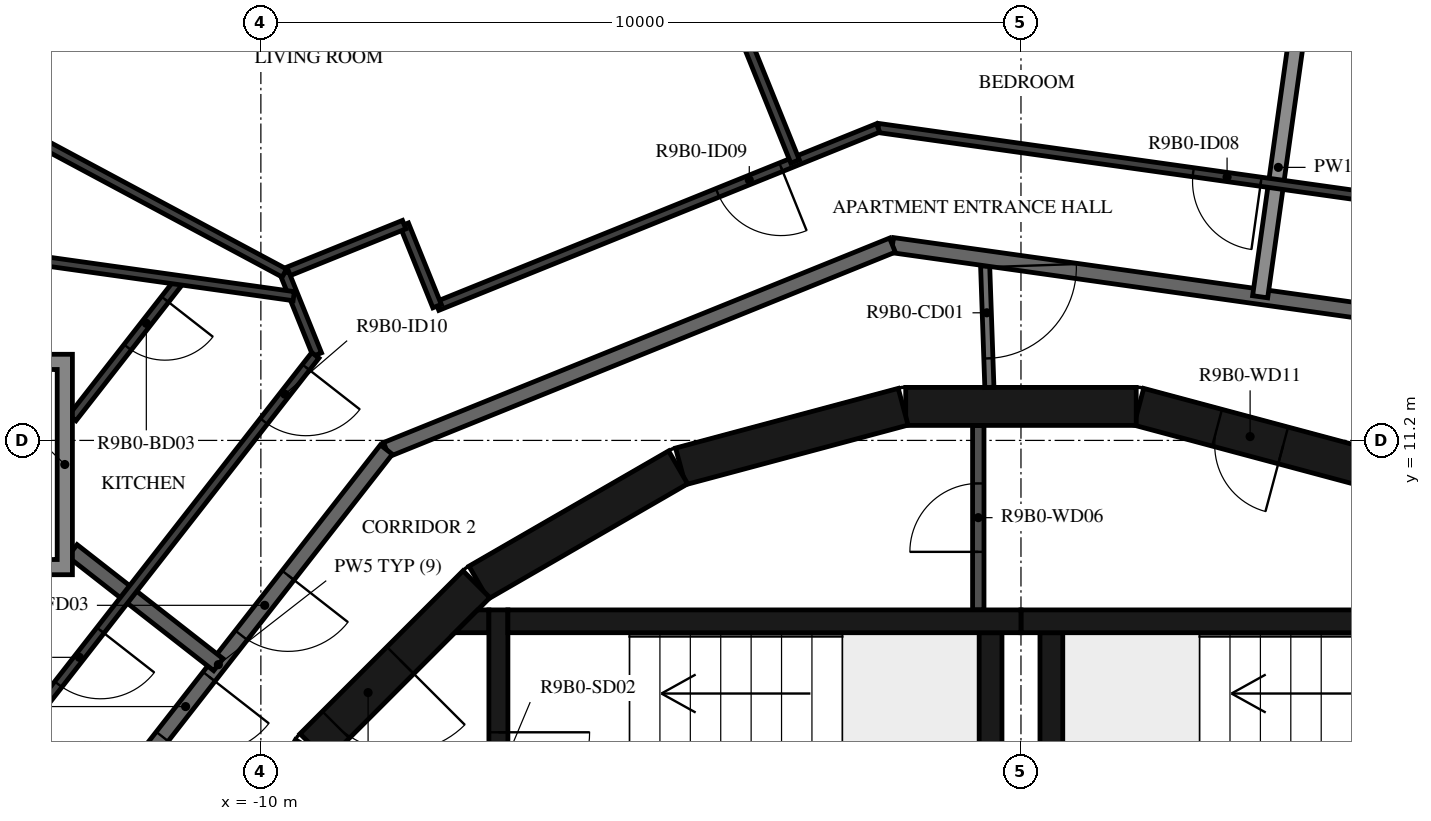
"""IFC4 building model, lengths in metres.
Left out: names, types, materials, properties, quantities, classifications, styles, units other than length and angle.
Written with IfcOpenShell. Run it as: python <this file> out.ifc"""

import sys

from ifc_helpers import new_model, si_unit, direction, frame, frame_2d, origin, place, context, subcontext, project, spatial, polyline, rectangle, outline, extrude, element, fill, save


model = new_model("IFC4")
c1 = context("Model", 3, precision=1e-05, world=origin(), true_north=direction((0.0, 1.0)))
c2 = subcontext(c1, "Body", "Model", "MODEL_VIEW")
j1 = project(units=[si_unit("LENGTHUNIT", "METRE"), si_unit("PLANEANGLEUNIT", "RADIAN")], contexts=[c1])
p1 = place(None, origin())
s1 = spatial("IfcSite", under=j1, at=p1, CompositionType="ELEMENT")
p2 = place(p1, origin())
s2 = spatial("IfcBuilding", under=s1, at=p2, CompositionType="ELEMENT")
p3 = place(p2, frame((0.0, 0.0, 347.0)))
s3 = spatial("IfcBuildingStorey", under=s2, at=p3, CompositionType="ELEMENT", Elevation=347.0)
p4 = place(p3, frame((4.479, 10.858, 0.0), z_axis=(0.0, 0.0, 1.0), x_axis=(-0.965948410781, 0.258734743916, 0.0)))
e1 = element("IfcWall", 1, at=p4, inside=s3, PredefinedType="SHEAR", context=c2, shape_type="SweptSolid", body=[
    extrude(rectangle(XDim=3.033, YDim=0.5, at=frame_2d((1.516, 0.0))), origin(), (0.0, 0.0, 1.0), 3.12),
])
p5 = place(p4, frame((1.066, 0.0, 0.0)))
e2 = element("IfcOpeningElement", 2, at=p5, cuts=e1, PredefinedType="OPENING", context=c2, shape_type="SweptSolid", body=[
    extrude(rectangle(XDim=0.9, YDim=2.1, at=frame_2d((0.45, 1.05))), frame((0.0, 0.26, 0.0), z_axis=(0.0, -1.0, 0.0), x_axis=(1.0, 0.0, 0.0)), (0.0, 0.0, 1.0), 0.52),
])
for number, where, z_axis, x_axis in (
    (3, (1.516, 11.647, 0.0), (0.0, 0.0, 1.0), (-1.0, 0.0, 0.0)),
    (4, (-1.55, 11.643, 0.0), (0.0, 0.0, 1.0), (-0.966, -0.259, 0.0)),
    (5, (-4.51, 10.845, 0.0), (0.0, 0.0, 1.0), (-0.866, -0.5, 0.0)),
):
    element("IfcWall", number, at=place(p3, frame(where, z_axis=z_axis, x_axis=x_axis)), inside=s3, PredefinedType="SHEAR", context=c2, shape_type="SweptSolid", body=[
        extrude(rectangle(XDim=3.033, YDim=0.5, at=frame_2d((1.516, 0.0))), origin(), (0.0, 0.0, 1.0), 3.12),
    ])
p6 = place(p3, frame((-7.164, 9.308, 0.0), z_axis=(0.0, 0.0, 1.0), x_axis=(-0.707106781187, -0.707106781187, 0.0)))
e6 = element("IfcWall", 6, at=p6, inside=s3, PredefinedType="SHEAR", context=c2, shape_type="SweptSolid", body=[
    extrude(rectangle(XDim=3.032, YDim=0.5, at=frame_2d((1.516, 0.0))), origin(), (0.0, 0.0, 1.0), 3.12),
])
p7 = place(p6, frame((1.416, 0.0, 0.0)))
e7 = element("IfcOpeningElement", 7, at=p7, cuts=e6, PredefinedType="OPENING", context=c2, shape_type="SweptSolid", body=[
    extrude(rectangle(XDim=1.2, YDim=2.1, at=frame_2d((0.6, 1.05))), frame((0.0, 0.26, 0.0), z_axis=(0.0, -1.0, 0.0), x_axis=(1.0, 0.0, 0.0)), (0.0, 0.0, 1.0), 0.52),
])
p8 = place(p3, frame((-9.329, 7.137, 0.0), z_axis=(0.0, 0.0, 1.0), x_axis=(-0.500087131594, -0.865975092491, 0.0)))
e8 = element("IfcWall", 8, at=p8, inside=s3, PredefinedType="SHEAR", context=c2, shape_type="SweptSolid", body=[
    extrude(rectangle(XDim=3.033, YDim=0.5, at=frame_2d((1.516, 0.0))), origin(), (0.0, 0.0, 1.0), 3.12),
])
p9 = place(p3, frame((0.0, 8.82, 0.0), z_axis=(0.0, 0.0, 1.0), x_axis=(1.0, 0.0, 0.0)))
e9 = element("IfcWall", 9, at=p9, inside=s3, PredefinedType="SHEAR", context=c2, shape_type="SweptSolid", body=[
    extrude(rectangle(XDim=6.75, YDim=0.3, at=frame_2d((3.375, 0.0))), origin(), (0.0, 0.0, 1.0), 3.12),
])
p10 = place(p3, frame((0.4, 5.35, 0.0), z_axis=(0.0, 0.0, 1.0), x_axis=(0.0, 1.0, 0.0)))
e10 = element("IfcWall", 10, at=p10, inside=s3, PredefinedType="SHEAR", context=c2, shape_type="SweptSolid", body=[
    extrude(rectangle(XDim=3.32, YDim=0.3, at=frame_2d((1.66, 0.0))), origin(), (0.0, 0.0, 1.0), 3.12),
])
p11 = place(p3, frame((-6.75, 8.82, 0.0), z_axis=(0.0, 0.0, 1.0), x_axis=(1.0, 0.0, 0.0)))
e11 = element("IfcWall", 11, at=p11, inside=s3, PredefinedType="SHEAR", context=c2, shape_type="SweptSolid", body=[
    extrude(rectangle(XDim=6.75, YDim=0.3, at=frame_2d((3.375, 0.0))), origin(), (0.0, 0.0, 1.0), 3.12),
])
p12 = place(p3, frame((-0.4, 5.35, 0.0), z_axis=(0.0, 0.0, 1.0), x_axis=(0.0, 1.0, 0.0)))
e12 = element("IfcWall", 12, at=p12, inside=s3, PredefinedType="SHEAR", context=c2, shape_type="SweptSolid", body=[
    extrude(rectangle(XDim=3.32, YDim=0.3, at=frame_2d((1.66, 0.0))), origin(), (0.0, 0.0, 1.0), 3.12),
])
p13 = place(p3, frame((-6.875, 8.97, 0.0), z_axis=(0.0, 0.0, 1.0), x_axis=(0.0, -1.0, 0.0)))
e13 = element("IfcWall", 13, at=p13, inside=s3, PredefinedType="SHEAR", context=c2, shape_type="SweptSolid", body=[
    extrude(rectangle(XDim=3.92, YDim=0.25, at=frame_2d((1.96, 0.0))), origin(), (0.0, 0.0, 1.0), 3.12),
])
p14 = place(p13, frame((1.61, 0.0, 0.0)))
e14 = element("IfcOpeningElement", 14, at=p14, cuts=e13, PredefinedType="OPENING", context=c2, shape_type="SweptSolid", body=[
    extrude(rectangle(XDim=1.2, YDim=2.1, at=frame_2d((0.6, 1.05))), frame((0.0, 0.135, 0.0), z_axis=(0.0, -1.0, 0.0), x_axis=(1.0, 0.0, 0.0)), (0.0, 0.0, 1.0), 0.27),
])
p15 = place(p3, origin())
e15 = element("IfcWall", 15, at=p15, inside=s3, PredefinedType="SHEAR", context=c2, shape_type="SweptSolid", body=[
    extrude(outline(polyline([(-7.148, 8.97), (-7.0, 8.97), (-7.0, 8.67), (-7.448, 8.67), (-7.148, 8.97)])), origin(), (0.0, 0.0, 1.0), 3.12),
])
p16 = place(p3, frame((-0.562, 8.97, 0.0), z_axis=(0.0, 0.0, 1.0), x_axis=(0.0, 1.0, 0.0)))
e16 = element("IfcWall", 16, at=p16, inside=s3, PredefinedType="PARTITIONING", context=c2, shape_type="SweptSolid", body=[
    extrude(rectangle(XDim=2.427, YDim=0.15, at=frame_2d((1.214, 0.0))), origin(), (0.0, 0.0, 1.0), 3.12),
])
p17 = place(p16, frame((0.764, 0.0, 0.0)))
e17 = element("IfcOpeningElement", 17, at=p17, cuts=e16, PredefinedType="OPENING", context=c2, shape_type="SweptSolid", body=[
    extrude(rectangle(XDim=0.9, YDim=2.1, at=frame_2d((0.45, 1.05))), frame((0.0, 0.085, 0.0), z_axis=(0.0, -1.0, 0.0), x_axis=(1.0, 0.0, 0.0)), (0.0, 0.0, 1.0), 0.17),
])
p18 = place(p3, frame((-0.475, 13.598, 0.0), z_axis=(0.0, 0.0, 1.0), x_axis=(0.034852521429, -0.999392466326, 0.0)))
e18 = element("IfcWall", 18, at=p18, inside=s3, PredefinedType="PARTITIONING", context=c2, shape_type="SweptSolid", body=[
    extrude(rectangle(XDim=1.702, YDim=0.12, at=frame_2d((0.851, 0.0))), origin(), (0.0, 0.0, 1.0), 3.12),
])
p19 = place(p18, frame((0.12, 0.0, 0.0)))
e19 = element("IfcOpeningElement", 19, at=p19, cuts=e18, PredefinedType="OPENING", context=c2, shape_type="SweptSolid", body=[
    extrude(rectangle(XDim=1.2, YDim=2.1, at=frame_2d((0.6, 1.05))), frame((0.0, 0.07, 0.0), z_axis=(0.0, -1.0, 0.0), x_axis=(1.0, 0.0, 0.0)), (0.0, 0.0, 1.0), 0.14),
])
p20 = place(p3, frame((5.42, 12.77, 0.0), z_axis=(0.0, 0.0, 1.0), x_axis=(-0.990270565508, 0.139155334385, 0.0)))
e20 = element("IfcWall", 20, at=p20, inside=s3, PredefinedType="STANDARD", context=c2, shape_type="SweptSolid", body=[
    extrude(rectangle(XDim=7.181, YDim=0.2, at=frame_2d((3.59, 0.0))), origin(), (0.0, 0.0, 1.0), 3.12),
])
p21 = place(p3, frame((-1.691, 13.769, 0.0), z_axis=(0.0, 0.0, 1.0), x_axis=(-0.92717916932, -0.374618189599, 0.0)))
e21 = element("IfcWall", 21, at=p21, inside=s3, PredefinedType="STANDARD", context=c2, shape_type="SweptSolid", body=[
    extrude(rectangle(XDim=7.181, YDim=0.2, at=frame_2d((3.591, 0.0))), origin(), (0.0, 0.0, 1.0), 3.12),
])
p22 = place(p3, frame((-8.349, 11.079, 0.0), z_axis=(0.0, 0.0, 1.0), x_axis=(-0.615669112324, -0.78800478687, 0.0)))
e22 = element("IfcWall", 22, at=p22, inside=s3, PredefinedType="STANDARD", context=c2, shape_type="SweptSolid", body=[
    extrude(rectangle(XDim=7.181, YDim=0.2, at=frame_2d((3.591, 0.0))), origin(), (0.0, 0.0, 1.0), 3.12),
])
p23 = place(p22, frame((2.1, 0.0, 0.0)))
e23 = element("IfcOpeningElement", 23, at=p23, cuts=e22, PredefinedType="OPENING", context=c2, shape_type="SweptSolid", body=[
    extrude(rectangle(XDim=1.0, YDim=2.1, at=frame_2d((0.5, 1.05))), frame((0.0, 0.11, 0.0), z_axis=(0.0, -1.0, 0.0), x_axis=(1.0, 0.0, 0.0)), (0.0, 0.0, 1.0), 0.22),
])
p24 = place(p22, frame((3.79, 0.0, 0.0)))
e24 = element("IfcOpeningElement", 24, at=p24, cuts=e22, PredefinedType="OPENING", context=c2, shape_type="SweptSolid", body=[
    extrude(rectangle(XDim=1.0, YDim=2.1, at=frame_2d((0.5, 1.05))), frame((0.0, 0.11, 0.0), z_axis=(0.0, -1.0, 0.0), x_axis=(1.0, 0.0, 0.0)), (0.0, 0.0, 1.0), 0.22),
])
p25 = place(p3, frame((3.625, 16.494, 0.0), z_axis=(0.0, 0.0, 1.0), x_axis=(-0.139174320859, -0.990267897295, 0.0)))
e25 = element("IfcWall", 25, at=p25, inside=s3, PredefinedType="STANDARD", context=c2, shape_type="SweptSolid", body=[
    extrude(rectangle(XDim=3.438, YDim=0.2, at=frame_2d((1.719, 0.0))), origin(), (0.0, 0.0, 1.0), 2.73),
])
p26 = place(p3, frame((-12.479, 9.75, 0.0), z_axis=(0.0, 0.0, 1.0), x_axis=(0.788050197026, -0.615610986717, 0.0)))
e26 = element("IfcWall", 26, at=p26, inside=s3, PredefinedType="STANDARD", context=c2, shape_type="SweptSolid", body=[
    extrude(rectangle(XDim=2.437, YDim=0.2, at=frame_2d((1.218, 0.0))), origin(), (0.0, 0.0, 1.0), 3.12),
])
p27 = place(p3, frame((6.027, 14.199, 0.0), z_axis=(0.0, 0.0, 1.0), x_axis=(-0.990271593532, 0.139148018469, 0.0)))
e27 = element("IfcWall", 27, at=p27, inside=s3, PredefinedType="PARTITIONING", context=c2, shape_type="SweptSolid", body=[
    extrude(rectangle(XDim=7.985, YDim=0.12, at=frame_2d((3.992, 0.0))), origin(), (0.0, 0.0, 1.0), 3.12),
])
p28 = place(p27, frame((2.898, 0.0, 0.0)))
e28 = element("IfcOpeningElement", 28, at=p28, cuts=e27, PredefinedType="OPENING", context=c2, shape_type="SweptSolid", body=[
    extrude(rectangle(XDim=0.9, YDim=2.1, at=frame_2d((0.45, 1.05))), frame((0.0, 0.07, 0.0), z_axis=(0.0, -1.0, 0.0), x_axis=(1.0, 0.0, 0.0)), (0.0, 0.0, 1.0), 0.14),
])
p29 = place(p3, frame((-1.88, 15.311, 0.0), z_axis=(0.0, 0.0, 1.0), x_axis=(-0.927182163322, -0.374610779365, 0.0)))
e29 = element("IfcWall", 29, at=p29, inside=s3, PredefinedType="PARTITIONING", context=c2, shape_type="SweptSolid", body=[
    extrude(rectangle(XDim=6.257, YDim=0.12, at=frame_2d((3.128, 0.0))), origin(), (0.0, 0.0, 1.0), 3.12),
])
p30 = place(p29, frame((1.377, 0.0, 0.0)))
e30 = element("IfcOpeningElement", 30, at=p30, cuts=e29, PredefinedType="OPENING", context=c2, shape_type="SweptSolid", body=[
    extrude(rectangle(XDim=0.9, YDim=2.1, at=frame_2d((0.45, 1.05))), frame((0.0, 0.07, 0.0), z_axis=(0.0, -1.0, 0.0), x_axis=(1.0, 0.0, 0.0)), (0.0, 0.0, 1.0), 0.14),
])
p31 = place(p3, frame((-7.681, 12.967, 0.0), z_axis=(0.0, 0.0, 1.0), x_axis=(-0.374592224266, 0.927189659951, 0.0)))
e31 = element("IfcWall", 31, at=p31, inside=s3, PredefinedType="PARTITIONING", context=c2, shape_type="SweptSolid", body=[
    extrude(rectangle(XDim=1.156, YDim=0.12, at=frame_2d((0.578, 0.0))), origin(), (0.0, 0.0, 1.0), 3.12),
])
p32 = place(p3, frame((-8.115, 14.039, 0.0), z_axis=(0.0, 0.0, 1.0), x_axis=(-0.927153589835, -0.374681492546, 0.0)))
e32 = element("IfcWall", 32, at=p32, inside=s3, PredefinedType="PARTITIONING", context=c2, shape_type="SweptSolid", body=[
    extrude(rectangle(XDim=1.7, YDim=0.12, at=frame_2d((0.85, 0.0))), origin(), (0.0, 0.0, 1.0), 3.12),
])
p33 = place(p3, frame((-9.691, 13.402, 0.0), z_axis=(0.0, 0.0, 1.0), x_axis=(0.374484003097, -0.927233374844, 0.0)))
e33 = element("IfcWall", 33, at=p33, inside=s3, PredefinedType="PARTITIONING", context=c2, shape_type="SweptSolid", body=[
    extrude(rectangle(XDim=1.156, YDim=0.12, at=frame_2d((0.578, 0.0))), origin(), (0.0, 0.0, 1.0), 3.12),
])
p34 = place(p3, frame((-9.283, 12.319, 0.0), z_axis=(0.0, 0.0, 1.0), x_axis=(-0.61567489546, -0.788000268464, 0.0)))
e34 = element("IfcWall", 34, at=p34, inside=s3, PredefinedType="PARTITIONING", context=c2, shape_type="SweptSolid", body=[
    extrude(rectangle(XDim=7.985, YDim=0.12, at=frame_2d((3.992, 0.0))), origin(), (0.0, 0.0, 1.0), 3.12),
])
p35 = place(p34, frame((0.2, 0.0, 0.0)))
e35 = element("IfcOpeningElement", 35, at=p35, cuts=e34, PredefinedType="OPENING", context=c2, shape_type="SweptSolid", body=[
    extrude(rectangle(XDim=0.9, YDim=2.1, at=frame_2d((0.45, 1.05))), frame((0.0, 0.07, 0.0), z_axis=(0.0, -1.0, 0.0), x_axis=(1.0, 0.0, 0.0)), (0.0, 0.0, 1.0), 0.14),
])
p36 = place(p34, frame((4.592, 0.0, 0.0)))
e36 = element("IfcOpeningElement", 36, at=p36, cuts=e34, PredefinedType="OPENING", context=c2, shape_type="SweptSolid", body=[
    extrude(rectangle(XDim=0.9, YDim=2.1, at=frame_2d((0.45, 1.05))), frame((0.0, 0.07, 0.0), z_axis=(0.0, -1.0, 0.0), x_axis=(1.0, 0.0, 0.0)), (0.0, 0.0, 1.0), 0.14),
])
p37 = place(p3, frame((-4.065, 17.575, 0.0), z_axis=(0.0, 0.0, 1.0), x_axis=(0.374619347258, -0.927178701578, 0.0)))
e37 = element("IfcWall", 37, at=p37, inside=s3, PredefinedType="PARTITIONING", context=c2, shape_type="SweptSolid", body=[
    extrude(rectangle(XDim=2.918, YDim=0.12, at=frame_2d((1.459, 0.0))), origin(), (0.0, 0.0, 1.0), 3.12),
])
p38 = place(p3, frame((-17.896, 17.797, 0.0), z_axis=(0.0, 0.0, 1.0), x_axis=(0.88150492406, -0.4721748287, 0.0)))
e38 = element("IfcWall", 38, at=p38, inside=s3, PredefinedType="PARTITIONING", context=c2, shape_type="SweptSolid", body=[
    extrude(rectangle(XDim=9.308, YDim=0.12, at=frame_2d((4.654, 0.0))), origin(), (0.0, 0.0, 1.0), 3.12),
])
p39 = place(p38, frame((0.6, 0.0, 0.0)))
e39 = element("IfcOpeningElement", 39, at=p39, cuts=e38, PredefinedType="OPENING", context=c2, shape_type="SweptSolid", body=[
    extrude(rectangle(XDim=0.9, YDim=2.1, at=frame_2d((0.45, 1.05))), frame((0.0, 0.07, 0.0), z_axis=(0.0, -1.0, 0.0), x_axis=(1.0, 0.0, 0.0)), (0.0, 0.0, 1.0), 0.14),
])
p40 = place(p3, frame((-11.064, 13.308, 0.0), z_axis=(0.0, 0.0, 1.0), x_axis=(-0.615681126827, -0.787995399777, 0.0)))
e40 = element("IfcWall", 40, at=p40, inside=s3, PredefinedType="PARTITIONING", context=c2, shape_type="SweptSolid", body=[
    extrude(rectangle(XDim=2.3, YDim=0.12, at=frame_2d((1.15, 0.0))), origin(), (0.0, 0.0, 1.0), 3.12),
])
p41 = place(p40, frame((0.32, 0.0, 0.0)))
e41 = element("IfcOpeningElement", 41, at=p41, cuts=e40, PredefinedType="OPENING", context=c2, shape_type="SweptSolid", body=[
    extrude(rectangle(XDim=0.8, YDim=2.1, at=frame_2d((0.4, 1.05))), frame((0.0, 0.07, 0.0), z_axis=(0.0, -1.0, 0.0), x_axis=(1.0, 0.0, 0.0)), (0.0, 0.0, 1.0), 0.14),
])
p42 = place(p3, frame((-9.568, 13.097, 0.0), z_axis=(0.0, 0.0, 1.0), x_axis=(-0.990266931728, 0.13918119099, 0.0)))
e42 = element("IfcWall", 42, at=p42, inside=s3, PredefinedType="PARTITIONING", context=c2, shape_type="SweptSolid", body=[
    extrude(rectangle(XDim=3.708, YDim=0.12, at=frame_2d((1.854, 0.0))), origin(), (0.0, 0.0, 1.0), 3.12),
])
p43 = place(p3, origin())
e43 = element("IfcWall", 43, at=p43, inside=s3, PredefinedType="STANDARD", context=c2, shape_type="SweptSolid", body=[
    extrude(outline(polyline([(-12.479, 12.333), (-12.479, 9.433), (-15.379, 9.433), (-15.379, 12.333), (-12.479, 12.333)]), holes=[polyline([(-15.179, 9.633), (-12.679, 9.633), (-12.679, 12.133), (-15.179, 12.133), (-15.179, 9.633)])]), origin(), (0.0, 0.0, 1.0), 3.12),
])
p44 = place(p14, origin())
e44 = element("IfcDoor", 44, at=p44, inside=s3, OperationType="SINGLE_SWING_LEFT", PredefinedType="DOOR", context=c2, shape_type="SweptSolid", body=[
    extrude(rectangle(XDim=1.2, YDim=2.1, at=frame_2d((0.6, 1.05))), frame((0.0, 0.025, 0.0), z_axis=(0.0, -1.0, 0.0), x_axis=(1.0, 0.0, 0.0)), (0.0, 0.0, 1.0), 0.05),
])
fill(e14, e44)
p45 = place(p7, origin())
e45 = element("IfcDoor", 45, at=p45, inside=s3, OperationType="SINGLE_SWING_RIGHT", PredefinedType="DOOR", context=c2, shape_type="SweptSolid", body=[
    extrude(rectangle(XDim=1.2, YDim=2.1, at=frame_2d((0.6, 1.05))), frame((0.0, 0.025, 0.0), z_axis=(0.0, -1.0, 0.0), x_axis=(1.0, 0.0, 0.0)), (0.0, 0.0, 1.0), 0.05),
])
fill(e7, e45)
p46 = place(p17, origin())
e46 = element("IfcDoor", 46, at=p46, inside=s3, OperationType="SINGLE_SWING_RIGHT", PredefinedType="DOOR", context=c2, shape_type="SweptSolid", body=[
    extrude(rectangle(XDim=0.9, YDim=2.1, at=frame_2d((0.45, 1.05))), frame((0.0, 0.025, 0.0), z_axis=(0.0, -1.0, 0.0), x_axis=(1.0, 0.0, 0.0)), (0.0, 0.0, 1.0), 0.05),
])
fill(e17, e46)
p47 = place(p5, origin())
e47 = element("IfcDoor", 47, at=p47, inside=s3, OperationType="SINGLE_SWING_LEFT", PredefinedType="DOOR", context=c2, shape_type="SweptSolid", body=[
    extrude(rectangle(XDim=0.9, YDim=2.1, at=frame_2d((0.45, 1.05))), frame((0.0, 0.025, 0.0), z_axis=(0.0, -1.0, 0.0), x_axis=(1.0, 0.0, 0.0)), (0.0, 0.0, 1.0), 0.05),
])
fill(e2, e47)
p48 = place(p23, origin())
e48 = element("IfcDoor", 48, at=p48, inside=s3, OperationType="SINGLE_SWING_RIGHT", PredefinedType="DOOR", context=c2, shape_type="SweptSolid", body=[
    extrude(rectangle(XDim=1.0, YDim=2.1, at=frame_2d((0.5, 1.05))), frame((0.0, 0.025, 0.0), z_axis=(0.0, -1.0, 0.0), x_axis=(1.0, 0.0, 0.0)), (0.0, 0.0, 1.0), 0.05),
])
fill(e23, e48)
p49 = place(p28, origin())
e49 = element("IfcDoor", 49, at=p49, inside=s3, OperationType="SINGLE_SWING_LEFT", PredefinedType="DOOR", context=c2, shape_type="SweptSolid", body=[
    extrude(rectangle(XDim=0.9, YDim=2.1, at=frame_2d((0.45, 1.05))), frame((0.0, 0.025, 0.0), z_axis=(0.0, -1.0, 0.0), x_axis=(1.0, 0.0, 0.0)), (0.0, 0.0, 1.0), 0.05),
])
fill(e28, e49)
p50 = place(p30, origin())
e50 = element("IfcDoor", 50, at=p50, inside=s3, OperationType="SINGLE_SWING_RIGHT", PredefinedType="DOOR", context=c2, shape_type="SweptSolid", body=[
    extrude(rectangle(XDim=0.9, YDim=2.1, at=frame_2d((0.45, 1.05))), frame((0.0, 0.025, 0.0), z_axis=(0.0, -1.0, 0.0), x_axis=(1.0, 0.0, 0.0)), (0.0, 0.0, 1.0), 0.05),
])
fill(e30, e50)
p51 = place(p35, origin())
e51 = element("IfcDoor", 51, at=p51, inside=s3, OperationType="SINGLE_SWING_RIGHT", PredefinedType="DOOR", context=c2, shape_type="SweptSolid", body=[
    extrude(rectangle(XDim=0.9, YDim=2.1, at=frame_2d((0.45, 1.05))), frame((0.0, 0.025, 0.0), z_axis=(0.0, -1.0, 0.0), x_axis=(1.0, 0.0, 0.0)), (0.0, 0.0, 1.0), 0.05),
])
fill(e35, e51)
p52 = place(p41, origin())
e52 = element("IfcDoor", 52, at=p52, inside=s3, OperationType="SINGLE_SWING_RIGHT", PredefinedType="DOOR", context=c2, shape_type="SweptSolid", body=[
    extrude(rectangle(XDim=0.8, YDim=2.1, at=frame_2d((0.4, 1.05))), frame((0.0, 0.025, 0.0), z_axis=(0.0, -1.0, 0.0), x_axis=(1.0, 0.0, 0.0)), (0.0, 0.0, 1.0), 0.05),
])
fill(e41, e52)
p53 = place(p24, origin())
e53 = element("IfcDoor", 53, at=p53, inside=s3, OperationType="SINGLE_SWING_LEFT", PredefinedType="DOOR", context=c2, shape_type="SweptSolid", body=[
    extrude(rectangle(XDim=1.0, YDim=2.1, at=frame_2d((0.5, 1.05))), frame((0.0, 0.025, 0.0), z_axis=(0.0, -1.0, 0.0), x_axis=(1.0, 0.0, 0.0)), (0.0, 0.0, 1.0), 0.05),
])
fill(e24, e53)
p54 = place(p36, origin())
e54 = element("IfcDoor", 54, at=p54, inside=s3, OperationType="SINGLE_SWING_LEFT", PredefinedType="DOOR", context=c2, shape_type="SweptSolid", body=[
    extrude(rectangle(XDim=0.9, YDim=2.1, at=frame_2d((0.45, 1.05))), frame((0.0, 0.025, 0.0), z_axis=(0.0, -1.0, 0.0), x_axis=(1.0, 0.0, 0.0)), (0.0, 0.0, 1.0), 0.05),
])
fill(e36, e54)
p55 = place(p19, origin())
e55 = element("IfcDoor", 55, at=p55, inside=s3, OperationType="DOUBLE_DOOR_SINGLE_SWING", PredefinedType="DOOR", context=c2, shape_type="SweptSolid", body=[
    extrude(rectangle(XDim=1.2, YDim=2.1, at=frame_2d((0.6, 1.05))), frame((0.0, 0.025, 0.0), z_axis=(0.0, -1.0, 0.0), x_axis=(1.0, 0.0, 0.0)), (0.0, 0.0, 1.0), 0.05),
])
fill(e19, e55)
save(model, sys.argv[1])
